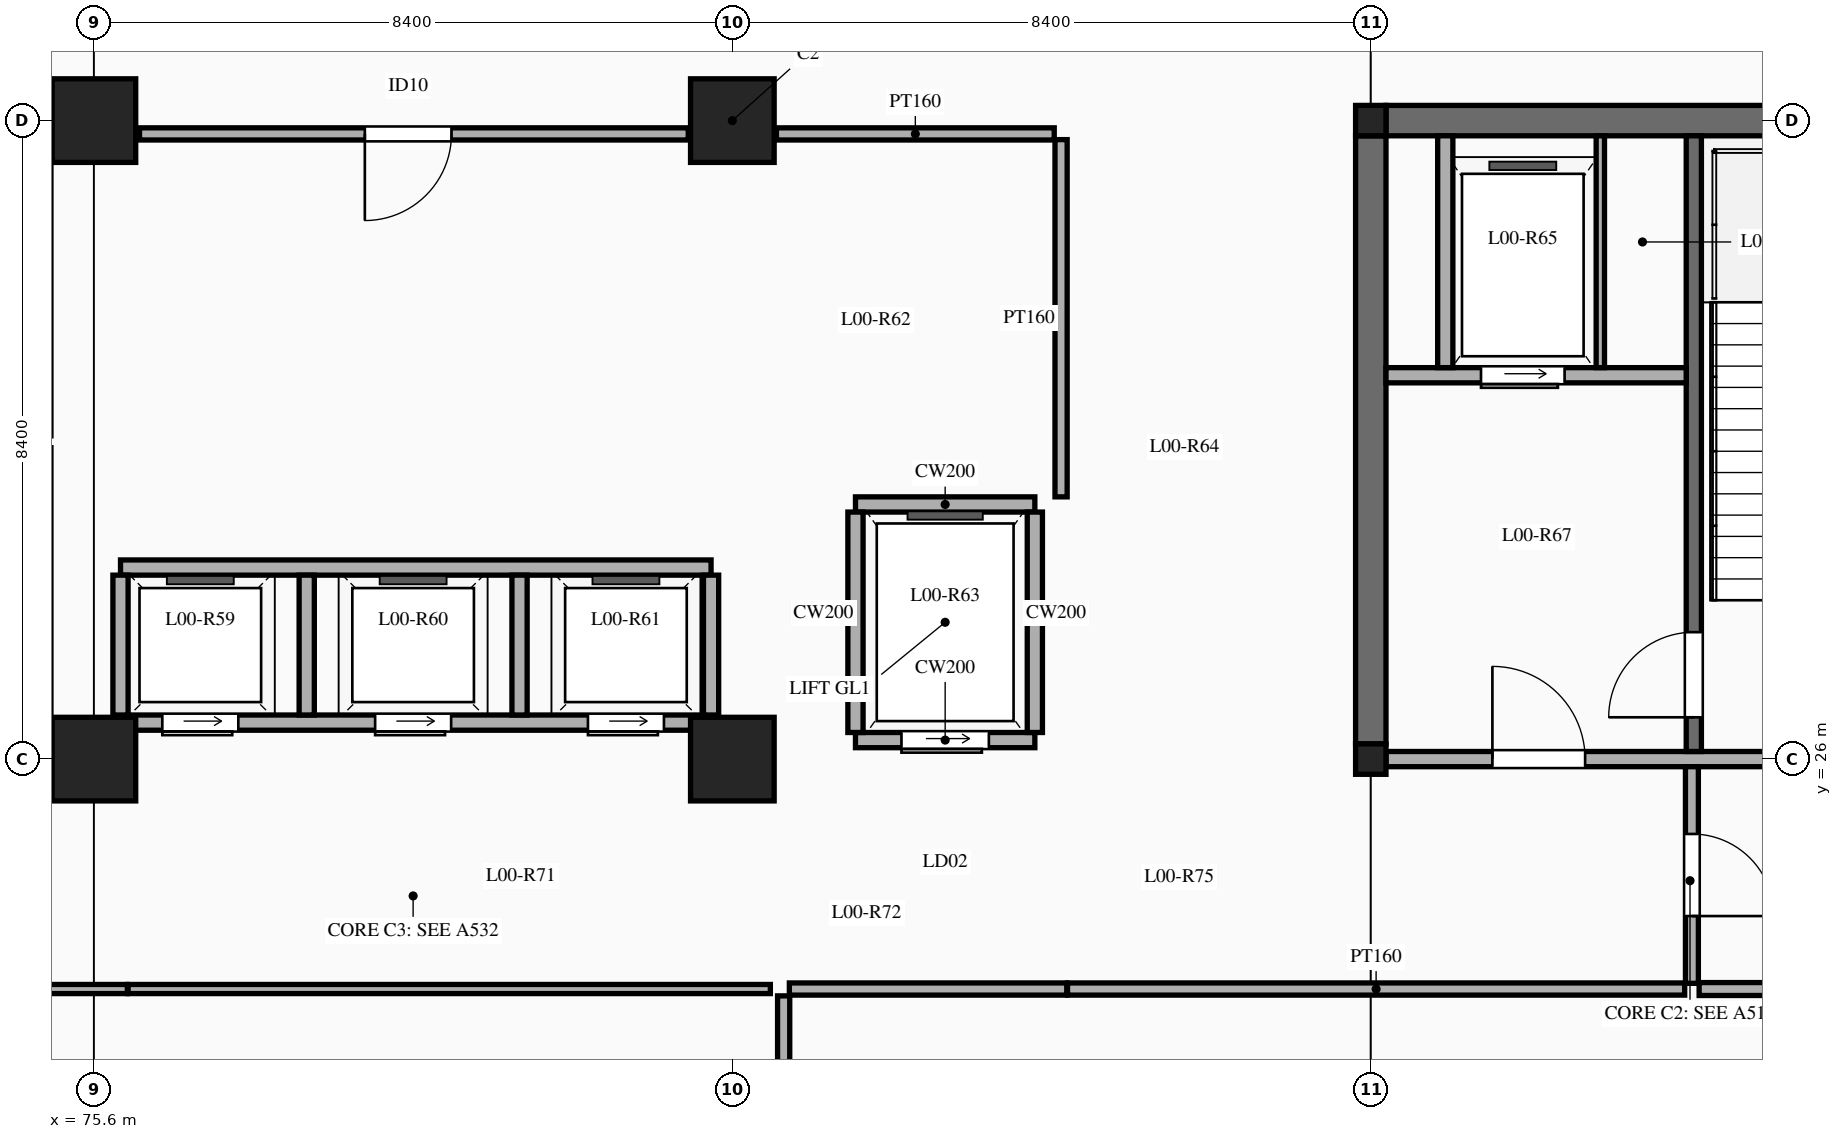
"""IFC4 building model, lengths in metres.
Left out: names, types, materials, properties, quantities, classifications, styles, units other than length and angle.
Written with IfcOpenShell. Run it as: python <this file> out.ifc"""

import sys

from ifc_helpers import new_model, si_unit, direction, frame, frame_2d, origin, origin_2d, place, context, subcontext, project, spatial, rectangle, extrude, element, fill, save


model = new_model("IFC4")
c1 = context("Model", 3, precision=1e-05, world=origin(), true_north=direction((0.0, 1.0)))
c2 = subcontext(c1, "Body", "Model", "MODEL_VIEW")
j1 = project(units=[si_unit("LENGTHUNIT", "METRE"), si_unit("PLANEANGLEUNIT", "RADIAN")], contexts=[c1])
p1 = place(None, origin())
s1 = spatial("IfcSite", under=j1, at=p1, CompositionType="ELEMENT")
p2 = place(p1, origin())
s2 = spatial("IfcBuilding", under=s1, at=p2, CompositionType="ELEMENT")
p3 = place(p2, origin())
s3 = spatial("IfcBuildingStorey", under=s2, at=p3, CompositionType="ELEMENT", Elevation=0.0)
for number, where, z_axis, x_axis in (
    (1, (75.6, 26.0, 0.0), (0.0, 0.0, 1.0), (1.0, 0.0, 0.0)),
    (2, (75.6, 34.4, 0.0), (0.0, 0.0, 1.0), (1.0, 0.0, 0.0)),
    (3, (84.0, 26.0, 0.0), (0.0, 0.0, 1.0), (1.0, 0.0, 0.0)),
    (4, (84.0, 34.4, 0.0), (0.0, 0.0, 1.0), (1.0, 0.0, 0.0)),
):
    element("IfcColumn", number, at=place(p3, frame(where, z_axis=z_axis, x_axis=x_axis)), inside=s3, PredefinedType="COLUMN", context=c2, shape_type="SweptSolid", body=[
        extrude(rectangle(XDim=1.1, YDim=1.1, at=origin_2d()), origin(), (0.0, 0.0, 1.0), 5.4),
    ])
for number, where, z_axis, x_axis in (
    (5, (92.4, 26.0, 0.0), (0.0, 0.0, 1.0), (1.0, 0.0, 0.0)),
    (6, (92.4, 34.4, 0.0), (0.0, 0.0, 1.0), (1.0, 0.0, 0.0)),
):
    element("IfcColumn", number, at=place(p3, frame(where, z_axis=z_axis, x_axis=x_axis)), inside=s3, PredefinedType="COLUMN", context=c2, shape_type="SweptSolid", body=[
        extrude(rectangle(XDim=0.4, YDim=0.4, at=origin_2d()), origin(), (0.0, 0.0, 1.0), 5.4),
    ])
for number, where, z_axis, x_axis in (
    (7, (92.4, 26.2, 0.0), (0.0, 0.0, 1.0), (0.0, 1.0, 0.0)),
    (8, (92.6, 34.4, 0.0), (0.0, 0.0, 1.0), (1.0, 0.0, 0.0)),
):
    element("IfcWall", number, at=place(p3, frame(where, z_axis=z_axis, x_axis=x_axis)), inside=s3, PredefinedType="SHEAR", context=c2, shape_type="SweptSolid", body=[
        extrude(rectangle(XDim=8.0, YDim=0.4, at=frame_2d((4.0, 0.0))), origin(), (0.0, 0.0, 1.0), 5.4),
    ])
p4 = place(p3, frame((92.6, 26.0, 0.0), z_axis=(0.0, 0.0, 1.0), x_axis=(1.0, 0.0, 0.0)))
e9 = element("IfcWall", 9, at=p4, inside=s3, PredefinedType="SOLIDWALL", context=c2, shape_type="SweptSolid", body=[
    extrude(rectangle(XDim=8.0, YDim=0.2, at=frame_2d((4.0, 0.0))), origin(), (0.0, 0.0, 1.0), 4.53),
])
p5 = place(p4, frame((1.4, 0.0, 0.0)))
e10 = element("IfcOpeningElement", 10, at=p5, cuts=e9, PredefinedType="OPENING", context=c2, shape_type="SweptSolid", body=[
    extrude(rectangle(XDim=1.22, YDim=2.15, at=frame_2d((0.61, 1.075))), frame((0.0, 0.11, 0.0), z_axis=(0.0, -1.0, 0.0), x_axis=(1.0, 0.0, 0.0)), (0.0, 0.0, 1.0), 0.22),
])
p6 = place(p4, frame((5.3, 0.0, 0.0)))
e11 = element("IfcOpeningElement", 11, at=p6, cuts=e9, PredefinedType="OPENING", context=c2, shape_type="SweptSolid", body=[
    extrude(rectangle(XDim=1.15, YDim=2.15, at=frame_2d((0.575, 1.075))), frame((0.0, 0.11, 0.0), z_axis=(0.0, -1.0, 0.0), x_axis=(1.0, 0.0, 0.0)), (0.0, 0.0, 1.0), 0.22),
])
p7 = place(p3, frame((96.65, 26.1, 0.0), z_axis=(0.0, 0.0, 1.0), x_axis=(0.0, 1.0, 0.0)))
e12 = element("IfcWall", 12, at=p7, inside=s3, PredefinedType="SOLIDWALL", context=c2, shape_type="SweptSolid", body=[
    extrude(rectangle(XDim=8.1, YDim=0.2, at=frame_2d((4.05, 0.0))), origin(), (0.0, 0.0, 1.0), 5.2),
])
p8 = place(p7, frame((0.45, 0.0, 0.0)))
e13 = element("IfcOpeningElement", 13, at=p8, cuts=e12, PredefinedType="OPENING", context=c2, shape_type="SweptSolid", body=[
    extrude(rectangle(XDim=1.12, YDim=2.15, at=frame_2d((0.56, 1.075))), frame((0.0, 0.11, 0.0), z_axis=(0.0, -1.0, 0.0), x_axis=(1.0, 0.0, 0.0)), (0.0, 0.0, 1.0), 0.22),
])
p9 = place(p3, frame((92.6, 31.05, 0.0), z_axis=(0.0, 0.0, 1.0), x_axis=(1.0, 0.0, 0.0)))
e14 = element("IfcWall", 14, at=p9, inside=s3, PredefinedType="SOLIDWALL", context=c2, shape_type="SweptSolid", body=[
    extrude(rectangle(XDim=3.95, YDim=0.2, at=frame_2d((1.975, 0.0))), origin(), (0.0, 0.0, 1.0), 5.2),
])
p10 = place(p9, frame((1.25, 0.0, 0.0)))
e15 = element("IfcOpeningElement", 15, at=p10, cuts=e14, PredefinedType="OPENING", context=c2, shape_type="SweptSolid", body=[
    extrude(rectangle(XDim=1.1, YDim=2.15, at=frame_2d((0.55, 1.075))), frame((0.0, 0.11, 0.0), z_axis=(0.0, -1.0, 0.0), x_axis=(1.0, 0.0, 0.0)), (0.0, 0.0, 1.0), 0.22),
])
p11 = place(p3, frame((95.42, 31.15, 0.0), z_axis=(0.0, 0.0, 1.0), x_axis=(0.0, 1.0, 0.0)))
e16 = element("IfcWall", 16, at=p11, inside=s3, PredefinedType="PARTITIONING", context=c2, shape_type="SweptSolid", body=[
    extrude(rectangle(XDim=3.05, YDim=0.11, at=frame_2d((1.525, 0.0))), origin(), (0.0, 0.0, 1.0), 5.2),
])
p12 = place(p3, frame((93.38, 31.15, 0.0), z_axis=(0.0, 0.0, 1.0), x_axis=(0.0, 1.0, 0.0)))
e17 = element("IfcWall", 17, at=p12, inside=s3, PredefinedType="SOLIDWALL", context=c2, shape_type="SweptSolid", body=[
    extrude(rectangle(XDim=3.05, YDim=0.2, at=frame_2d((1.525, 0.0))), origin(), (0.0, 0.0, 1.0), 5.2),
])
p13 = place(p3, frame((75.95, 26.48, 0.0), z_axis=(0.0, 0.0, 1.0), x_axis=(1.0, 0.0, 0.0)))
e18 = element("IfcWall", 18, at=p13, inside=s3, PredefinedType="SOLIDWALL", context=c2, shape_type="SweptSolid", body=[
    extrude(rectangle(XDim=7.77, YDim=0.2, at=frame_2d((3.885, 0.0))), origin(), (0.0, 0.0, 1.0), 5.2),
])
p14 = place(p13, frame((0.55, 0.0, 0.0)))
e19 = element("IfcOpeningElement", 19, at=p14, cuts=e18, PredefinedType="OPENING", context=c2, shape_type="SweptSolid", body=[
    extrude(rectangle(XDim=1.0, YDim=2.15, at=frame_2d((0.5, 1.075))), frame((0.0, 0.11, 0.0), z_axis=(0.0, -1.0, 0.0), x_axis=(1.0, 0.0, 0.0)), (0.0, 0.0, 1.0), 0.22),
])
p15 = place(p13, frame((3.35, 0.0, 0.0)))
e20 = element("IfcOpeningElement", 20, at=p15, cuts=e18, PredefinedType="OPENING", context=c2, shape_type="SweptSolid", body=[
    extrude(rectangle(XDim=1.0, YDim=2.15, at=frame_2d((0.5, 1.075))), frame((0.0, 0.11, 0.0), z_axis=(0.0, -1.0, 0.0), x_axis=(1.0, 0.0, 0.0)), (0.0, 0.0, 1.0), 0.22),
])
p16 = place(p13, frame((6.15, 0.0, 0.0)))
e21 = element("IfcOpeningElement", 21, at=p16, cuts=e18, PredefinedType="OPENING", context=c2, shape_type="SweptSolid", body=[
    extrude(rectangle(XDim=1.0, YDim=2.15, at=frame_2d((0.5, 1.075))), frame((0.0, 0.11, 0.0), z_axis=(0.0, -1.0, 0.0), x_axis=(1.0, 0.0, 0.0)), (0.0, 0.0, 1.0), 0.22),
])
p17 = place(p3, frame((75.95, 28.52, 0.0), z_axis=(0.0, 0.0, 1.0), x_axis=(1.0, 0.0, 0.0)))
e22 = element("IfcWall", 22, at=p17, inside=s3, PredefinedType="SOLIDWALL", context=c2, shape_type="SweptSolid", body=[
    extrude(rectangle(XDim=7.77, YDim=0.2, at=frame_2d((3.885, 0.0))), origin(), (0.0, 0.0, 1.0), 5.2),
])
p18 = place(p3, frame((75.95, 26.58, 0.0), z_axis=(0.0, 0.0, 1.0), x_axis=(0.0, 1.0, 0.0)))
e23 = element("IfcWall", 23, at=p18, inside=s3, PredefinedType="SOLIDWALL", context=c2, shape_type="SweptSolid", body=[
    extrude(rectangle(XDim=1.84, YDim=0.2, at=frame_2d((0.92, 0.0))), origin(), (0.0, 0.0, 1.0), 4.58),
])
for number, where, z_axis, x_axis in (
    (24, (78.4, 26.58, 0.0), (0.0, 0.0, 1.0), (0.0, 1.0, 0.0)),
    (25, (81.2, 26.58, 0.0), (0.0, 0.0, 1.0), (0.0, 1.0, 0.0)),
):
    element("IfcWall", number, at=place(p3, frame(where, z_axis=z_axis, x_axis=x_axis)), inside=s3, PredefinedType="SOLIDWALL", context=c2, shape_type="SweptSolid", body=[
        extrude(rectangle(XDim=1.84, YDim=0.2, at=frame_2d((0.92, 0.0))), origin(), (0.0, 0.0, 1.0), 5.2),
    ])
p19 = place(p3, frame((83.72, 26.58, 0.0), z_axis=(0.0, 0.0, 1.0), x_axis=(0.0, 1.0, 0.0)))
e26 = element("IfcWall", 26, at=p19, inside=s3, PredefinedType="SOLIDWALL", context=c2, shape_type="SweptSolid", body=[
    extrude(rectangle(XDim=1.84, YDim=0.2, at=frame_2d((0.92, 0.0))), origin(), (0.0, 0.0, 1.0), 4.58),
])
p20 = place(p3, frame((85.62, 26.25, 0.0), z_axis=(0.0, 0.0, 1.0), x_axis=(1.0, 0.0, 0.0)))
e27 = element("IfcWall", 27, at=p20, inside=s3, PredefinedType="SOLIDWALL", context=c2, shape_type="SweptSolid", body=[
    extrude(rectangle(XDim=2.36, YDim=0.2, at=frame_2d((1.18, 0.0))), origin(), (0.0, 0.0, 1.0), 4.53),
])
p21 = place(p20, frame((0.605, 0.0, 0.0)))
e28 = element("IfcOpeningElement", 28, at=p21, cuts=e27, PredefinedType="OPENING", context=c2, shape_type="SweptSolid", body=[
    extrude(rectangle(XDim=1.15, YDim=2.2, at=frame_2d((0.575, 1.1))), frame((0.0, 0.11, 0.0), z_axis=(0.0, -1.0, 0.0), x_axis=(1.0, 0.0, 0.0)), (0.0, 0.0, 1.0), 0.22),
])
p22 = place(p3, frame((85.62, 29.35, 0.0), z_axis=(0.0, 0.0, 1.0), x_axis=(1.0, 0.0, 0.0)))
e29 = element("IfcWall", 29, at=p22, inside=s3, PredefinedType="SOLIDWALL", context=c2, shape_type="SweptSolid", body=[
    extrude(rectangle(XDim=2.36, YDim=0.2, at=frame_2d((1.18, 0.0))), origin(), (0.0, 0.0, 1.0), 5.2),
])
p23 = place(p3, frame((85.62, 26.35, 0.0), z_axis=(0.0, 0.0, 1.0), x_axis=(0.0, 1.0, 0.0)))
e30 = element("IfcWall", 30, at=p23, inside=s3, PredefinedType="SOLIDWALL", context=c2, shape_type="SweptSolid", body=[
    extrude(rectangle(XDim=2.9, YDim=0.2, at=frame_2d((1.45, 0.0))), origin(), (0.0, 0.0, 1.0), 5.2),
])
p24 = place(p3, frame((87.98, 26.35, 0.0), z_axis=(0.0, 0.0, 1.0), x_axis=(0.0, 1.0, 0.0)))
e31 = element("IfcWall", 31, at=p24, inside=s3, PredefinedType="SOLIDWALL", context=c2, shape_type="SweptSolid", body=[
    extrude(rectangle(XDim=2.9, YDim=0.2, at=frame_2d((1.45, 0.0))), origin(), (0.0, 0.0, 1.0), 4.83),
])
p25 = place(p3, frame((88.325, 29.45, 0.0), z_axis=(0.0, 0.0, 1.0), x_axis=(0.0, 1.0, 0.0)))
e32 = element("IfcWall", 32, at=p25, inside=s3, PredefinedType="PARTITIONING", context=c2, shape_type="SweptSolid", body=[
    extrude(rectangle(XDim=4.7, YDim=0.16, at=frame_2d((2.35, 0.0))), origin(), (0.0, 0.0, 1.0), 4.35),
])
p26 = place(p3, frame((76.2, 34.225, 0.0), z_axis=(0.0, 0.0, 1.0), x_axis=(1.0, 0.0, 0.0)))
e33 = element("IfcWall", 33, at=p26, inside=s3, PredefinedType="PARTITIONING", context=c2, shape_type="SweptSolid", body=[
    extrude(rectangle(XDim=7.22, YDim=0.16, at=frame_2d((3.61, 0.0))), origin(), (0.0, 0.0, 1.0), 4.35),
])
p27 = place(p26, frame((2.965, 0.0, 0.0)))
e34 = element("IfcOpeningElement", 34, at=p27, cuts=e33, PredefinedType="OPENING", context=c2, shape_type="SweptSolid", body=[
    extrude(rectangle(XDim=1.14, YDim=2.22, at=frame_2d((0.57, 1.11))), frame((0.0, 0.09, 0.0), z_axis=(0.0, -1.0, 0.0), x_axis=(1.0, 0.0, 0.0)), (0.0, 0.0, 1.0), 0.18),
])
p28 = place(p3, frame((84.58, 34.225, 0.0), z_axis=(0.0, 0.0, 1.0), x_axis=(1.0, 0.0, 0.0)))
e35 = element("IfcWall", 35, at=p28, inside=s3, PredefinedType="PARTITIONING", context=c2, shape_type="SweptSolid", body=[
    extrude(rectangle(XDim=3.655, YDim=0.16, at=frame_2d((1.828, 0.0))), origin(), (0.0, 0.0, 1.0), 4.35),
])
p29 = place(p3, frame((76.05, 22.975, 0.0), z_axis=(0.0, 0.0, 1.0), x_axis=(1.0, 0.0, 0.0)))
e36 = element("IfcWall", 36, at=p29, inside=s3, PredefinedType="PARTITIONING", context=c2, shape_type="SweptSolid", body=[
    extrude(rectangle(XDim=8.45, YDim=0.12, at=frame_2d((4.225, 0.0))), origin(), (0.0, 0.0, 1.0), 4.35),
])
p30 = place(p3, frame((84.75, 22.975, 0.0), z_axis=(0.0, 0.0, 1.0), x_axis=(1.0, 0.0, 0.0)))
e37 = element("IfcWall", 37, at=p30, inside=s3, PredefinedType="PARTITIONING", context=c2, shape_type="SweptSolid", body=[
    extrude(rectangle(XDim=3.65, YDim=0.16, at=frame_2d((1.825, 0.0))), origin(), (0.0, 0.0, 1.0), 4.35),
])
p31 = place(p3, frame((63.0, 22.975, 0.0), z_axis=(0.0, 0.0, 1.0), x_axis=(1.0, 0.0, 0.0)))
e38 = element("IfcWall", 38, at=p31, inside=s3, PredefinedType="PARTITIONING", context=c2, shape_type="SweptSolid", body=[
    extrude(rectangle(XDim=13.04, YDim=0.12, at=frame_2d((6.52, 0.0))), origin(), (0.0, 0.0, 1.0), 4.35),
])
p32 = place(p3, frame((96.625, 23.05, 0.0), z_axis=(0.0, 0.0, 1.0), x_axis=(0.0, 1.0, 0.0)))
e39 = element("IfcWall", 39, at=p32, inside=s3, PredefinedType="PARTITIONING", context=c2, shape_type="SweptSolid", body=[
    extrude(rectangle(XDim=2.85, YDim=0.17, at=frame_2d((1.425, 0.0))), origin(), (0.0, 0.0, 1.0), 4.35),
])
p33 = place(p32, frame((0.885, 0.0, 0.0)))
e40 = element("IfcOpeningElement", 40, at=p33, cuts=e39, PredefinedType="OPENING", context=c2, shape_type="SweptSolid", body=[
    extrude(rectangle(XDim=1.08, YDim=2.15, at=frame_2d((0.54, 1.075))), frame((0.0, 0.095, 0.0), z_axis=(0.0, -1.0, 0.0), x_axis=(1.0, 0.0, 0.0)), (0.0, 0.0, 1.0), 0.19),
])
p34 = place(p3, frame((88.41, 22.975, 0.0), z_axis=(0.0, 0.0, 1.0), x_axis=(1.0, 0.0, 0.0)))
e41 = element("IfcWall", 41, at=p34, inside=s3, PredefinedType="PARTITIONING", context=c2, shape_type="SweptSolid", body=[
    extrude(rectangle(XDim=8.12, YDim=0.16, at=frame_2d((4.06, 0.0))), origin(), (0.0, 0.0, 1.0), 4.35),
])
p35 = place(p3, frame((96.72, 22.975, 0.0), z_axis=(0.0, 0.0, 1.0), x_axis=(1.0, 0.0, 0.0)))
e42 = element("IfcWall", 42, at=p35, inside=s3, PredefinedType="PARTITIONING", context=c2, shape_type="SweptSolid", body=[
    extrude(rectangle(XDim=12.03, YDim=0.17, at=frame_2d((6.015, 0.0))), origin(), (0.0, 0.0, 1.0), 4.35),
])
p36 = place(p3, frame((84.675, 18.23, 0.0), z_axis=(0.0, 0.0, 1.0), x_axis=(0.0, 1.0, 0.0)))
e43 = element("IfcWall", 43, at=p36, inside=s3, PredefinedType="PARTITIONING", context=c2, shape_type="SweptSolid", body=[
    extrude(rectangle(XDim=4.655, YDim=0.16, at=frame_2d((2.328, 0.0))), origin(), (0.0, 0.0, 1.0), 4.35),
])
p37 = place(p5, origin())
e44 = element("IfcDoor", 44, at=p37, inside=s3, OperationType="SINGLE_SWING_LEFT", PredefinedType="DOOR", context=c2, shape_type="SweptSolid", body=[
    extrude(rectangle(XDim=1.22, YDim=2.15, at=frame_2d((0.61, 1.075))), frame((0.0, 0.025, 0.0), z_axis=(0.0, -1.0, 0.0), x_axis=(1.0, 0.0, 0.0)), (0.0, 0.0, 1.0), 0.05),
])
fill(e10, e44)
p38 = place(p8, origin())
e45 = element("IfcDoor", 45, at=p38, inside=s3, OperationType="SINGLE_SWING_LEFT", PredefinedType="DOOR", context=c2, shape_type="SweptSolid", body=[
    extrude(rectangle(XDim=1.12, YDim=2.15, at=frame_2d((0.56, 1.075))), frame((0.0, 0.025, 0.0), z_axis=(0.0, -1.0, 0.0), x_axis=(1.0, 0.0, 0.0)), (0.0, 0.0, 1.0), 0.05),
])
fill(e13, e45)
p39 = place(p10, frame((1.1, 0.0, 0.0), z_axis=(0.0, 0.0, 1.0), x_axis=(-1.0, 0.0, 0.0)))
e46 = element("IfcDoor", 46, at=p39, inside=s3, OperationType="SLIDING_TO_LEFT", PredefinedType="DOOR", context=c2, shape_type="SweptSolid", body=[
    extrude(rectangle(XDim=1.1, YDim=2.15, at=frame_2d((0.55, 1.075))), frame((0.0, 0.025, 0.0), z_axis=(0.0, -1.0, 0.0), x_axis=(1.0, 0.0, 0.0)), (0.0, 0.0, 1.0), 0.05),
])
fill(e15, e46)
p40 = place(p14, frame((1.0, 0.0, 0.0), z_axis=(0.0, 0.0, 1.0), x_axis=(-1.0, 0.0, 0.0)))
e47 = element("IfcDoor", 47, at=p40, inside=s3, OperationType="SLIDING_TO_LEFT", PredefinedType="DOOR", context=c2, shape_type="SweptSolid", body=[
    extrude(rectangle(XDim=1.0, YDim=2.15, at=frame_2d((0.5, 1.075))), frame((0.0, 0.025, 0.0), z_axis=(0.0, -1.0, 0.0), x_axis=(1.0, 0.0, 0.0)), (0.0, 0.0, 1.0), 0.05),
])
fill(e19, e47)
p41 = place(p15, frame((1.0, 0.0, 0.0), z_axis=(0.0, 0.0, 1.0), x_axis=(-1.0, 0.0, 0.0)))
e48 = element("IfcDoor", 48, at=p41, inside=s3, OperationType="SLIDING_TO_LEFT", PredefinedType="DOOR", context=c2, shape_type="SweptSolid", body=[
    extrude(rectangle(XDim=1.0, YDim=2.15, at=frame_2d((0.5, 1.075))), frame((0.0, 0.025, 0.0), z_axis=(0.0, -1.0, 0.0), x_axis=(1.0, 0.0, 0.0)), (0.0, 0.0, 1.0), 0.05),
])
fill(e20, e48)
p42 = place(p16, frame((1.0, 0.0, 0.0), z_axis=(0.0, 0.0, 1.0), x_axis=(-1.0, 0.0, 0.0)))
e49 = element("IfcDoor", 49, at=p42, inside=s3, OperationType="SLIDING_TO_LEFT", PredefinedType="DOOR", context=c2, shape_type="SweptSolid", body=[
    extrude(rectangle(XDim=1.0, YDim=2.15, at=frame_2d((0.5, 1.075))), frame((0.0, 0.025, 0.0), z_axis=(0.0, -1.0, 0.0), x_axis=(1.0, 0.0, 0.0)), (0.0, 0.0, 1.0), 0.05),
])
fill(e21, e49)
p43 = place(p21, frame((1.15, 0.0, 0.0), z_axis=(0.0, 0.0, 1.0), x_axis=(-1.0, 0.0, 0.0)))
e50 = element("IfcDoor", 50, at=p43, inside=s3, OperationType="SLIDING_TO_LEFT", PredefinedType="DOOR", context=c2, shape_type="SweptSolid", body=[
    extrude(rectangle(XDim=1.15, YDim=2.2, at=frame_2d((0.575, 1.1))), frame((0.0, 0.025, 0.0), z_axis=(0.0, -1.0, 0.0), x_axis=(1.0, 0.0, 0.0)), (0.0, 0.0, 1.0), 0.05),
])
fill(e28, e50)
p44 = place(p27, frame((1.14, 0.0, 0.0), z_axis=(0.0, 0.0, 1.0), x_axis=(-1.0, 0.0, 0.0)))
e51 = element("IfcDoor", 51, at=p44, inside=s3, OperationType="SINGLE_SWING_RIGHT", PredefinedType="DOOR", context=c2, shape_type="SweptSolid", body=[
    extrude(rectangle(XDim=1.14, YDim=2.22, at=frame_2d((0.57, 1.11))), frame((0.0, 0.025, 0.0), z_axis=(0.0, -1.0, 0.0), x_axis=(1.0, 0.0, 0.0)), (0.0, 0.0, 1.0), 0.05),
])
fill(e34, e51)
p45 = place(p33, frame((1.08, 0.0, 0.0), z_axis=(0.0, 0.0, 1.0), x_axis=(-1.0, 0.0, 0.0)))
e52 = element("IfcDoor", 52, at=p45, inside=s3, OperationType="SINGLE_SWING_RIGHT", PredefinedType="DOOR", context=c2, shape_type="SweptSolid", body=[
    extrude(rectangle(XDim=1.08, YDim=2.15, at=frame_2d((0.54, 1.075))), frame((0.0, 0.025, 0.0), z_axis=(0.0, -1.0, 0.0), x_axis=(1.0, 0.0, 0.0)), (0.0, 0.0, 1.0), 0.05),
])
fill(e40, e52)
save(model, sys.argv[1])
